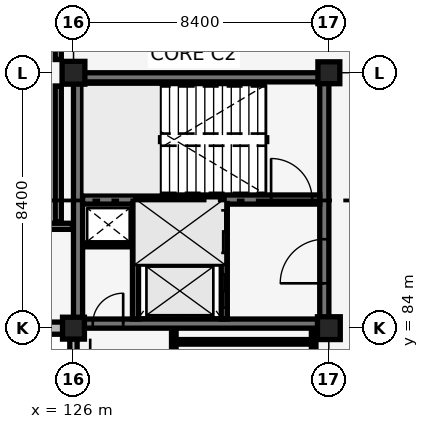
"""IFC4 building model, lengths in metres.
Left out: names, types, materials, properties, quantities, classifications, styles, units other than length and angle.
Written with IfcOpenShell. Run it as: python <this file> out.ifc"""

import sys

from ifc_helpers import new_model, si_unit, direction, frame, frame_2d, origin, origin_2d, place, context, subcontext, project, spatial, rectangle, extrude, element, fill, save


model = new_model("IFC4")
c1 = context("Model", 3, precision=1e-05, world=origin(), true_north=direction((0.0, 1.0)))
c2 = subcontext(c1, "Body", "Model", "MODEL_VIEW")
j1 = project(units=[si_unit("LENGTHUNIT", "METRE"), si_unit("PLANEANGLEUNIT", "RADIAN")], contexts=[c1])
p1 = place(None, origin())
s1 = spatial("IfcSite", under=j1, at=p1, CompositionType="ELEMENT")
p2 = place(p1, origin())
s2 = spatial("IfcBuilding", under=s1, at=p2, CompositionType="ELEMENT")
p3 = place(p2, frame((0.0, 0.0, 5.44)))
s3 = spatial("IfcBuildingStorey", under=s2, at=p3, CompositionType="ELEMENT", Elevation=5.44)
p4 = place(p3, frame((126.15, 84.15, 0.0), z_axis=(0.0, 0.0, 1.0), x_axis=(1.0, 0.0, 0.0)))
e1 = element("IfcWall", 1, at=p4, inside=s3, PredefinedType="SHEAR", context=c2, shape_type="SweptSolid", body=[
    extrude(rectangle(XDim=8.1, YDim=0.3, at=frame_2d((4.05, 0.0))), origin(), (0.0, 0.0, 1.0), 4.12),
])
p5 = place(p4, frame((0.485, 0.0, 0.0)))
e2 = element("IfcOpeningElement", 2, at=p5, cuts=e1, PredefinedType="OPENING", context=c2, shape_type="SweptSolid", body=[
    extrude(rectangle(XDim=1.0, YDim=2.15, at=frame_2d((0.5, 1.075))), frame((0.0, 0.16, 0.0), z_axis=(0.0, -1.0, 0.0), x_axis=(1.0, 0.0, 0.0)), (0.0, 0.0, 1.0), 0.32),
])
for number, where, z_axis, x_axis in (
    (3, (126.15, 92.25, 0.0), (0.0, 0.0, 1.0), (1.0, 0.0, 0.0)),
    (4, (126.15, 84.15, 0.0), (0.0, 0.0, 1.0), (0.0, 1.0, 0.0)),
):
    element("IfcWall", number, at=place(p3, frame(where, z_axis=z_axis, x_axis=x_axis)), inside=s3, PredefinedType="SHEAR", context=c2, shape_type="SweptSolid", body=[
        extrude(rectangle(XDim=8.1, YDim=0.3, at=frame_2d((4.05, 0.0))), origin(), (0.0, 0.0, 1.0), 4.12),
    ])
p6 = place(p3, frame((134.25, 84.15, 0.0), z_axis=(0.0, 0.0, 1.0), x_axis=(0.0, 1.0, 0.0)))
e5 = element("IfcWall", 5, at=p6, inside=s3, PredefinedType="SHEAR", context=c2, shape_type="SweptSolid", body=[
    extrude(rectangle(XDim=8.1, YDim=0.3, at=frame_2d((4.05, 0.0))), origin(), (0.0, 0.0, 1.0), 4.12),
])
p7 = place(p6, frame((1.325, 0.0, 0.0)))
e6 = element("IfcOpeningElement", 6, at=p7, cuts=e5, PredefinedType="OPENING", context=c2, shape_type="SweptSolid", body=[
    extrude(rectangle(XDim=1.45, YDim=2.15, at=frame_2d((0.725, 1.075))), frame((0.0, 0.16, 0.0), z_axis=(0.0, -1.0, 0.0), x_axis=(1.0, 0.0, 0.0)), (0.0, 0.0, 1.0), 0.32),
])
p8 = place(p3, frame((126.3, 88.23, 0.0), z_axis=(0.0, 0.0, 1.0), x_axis=(1.0, 0.0, 0.0)))
e7 = element("IfcWall", 7, at=p8, inside=s3, PredefinedType="SHEAR", context=c2, shape_type="SweptSolid", body=[
    extrude(rectangle(XDim=7.8, YDim=0.3, at=frame_2d((3.9, 0.0))), origin(), (0.0, 0.0, 1.0), 4.12),
])
p9 = place(p8, frame((6.2, 0.0, 0.0)))
e8 = element("IfcOpeningElement", 8, at=p9, cuts=e7, PredefinedType="OPENING", context=c2, shape_type="SweptSolid", body=[
    extrude(rectangle(XDim=1.35, YDim=2.15, at=frame_2d((0.675, 1.075))), frame((0.0, 0.16, 0.0), z_axis=(0.0, -1.0, 0.0), x_axis=(1.0, 0.0, 0.0)), (0.0, 0.0, 1.0), 0.32),
])
p10 = place(p3, frame((126.0, 84.0, 0.0), z_axis=(0.0, 0.0, 1.0), x_axis=(1.0, 0.0, 0.0)))
e9 = element("IfcColumn", 9, at=p10, inside=s3, PredefinedType="COLUMN", context=c2, shape_type="SweptSolid", body=[
    extrude(rectangle(XDim=0.72, YDim=0.72, at=origin_2d()), origin(), (0.0, 0.0, 1.0), 4.12),
])
for number, where, z_axis, x_axis in (
    (10, (126.0, 92.4, 0.0), (0.0, 0.0, 1.0), (1.0, 0.0, 0.0)),
    (11, (134.4, 84.0, 0.0), (0.0, 0.0, 1.0), (1.0, 0.0, 0.0)),
):
    element("IfcColumn", number, at=place(p3, frame(where, z_axis=z_axis, x_axis=x_axis)), inside=s3, PredefinedType="COLUMN", context=c2, shape_type="SweptSolid", body=[
        extrude(rectangle(XDim=0.75, YDim=0.75, at=origin_2d()), origin(), (0.0, 0.0, 1.0), 4.12),
    ])
p11 = place(p3, frame((134.4, 92.4, 0.0), z_axis=(0.0, 0.0, 1.0), x_axis=(1.0, 0.0, 0.0)))
e12 = element("IfcColumn", 12, at=p11, inside=s3, PredefinedType="COLUMN", context=c2, shape_type="SweptSolid", body=[
    extrude(rectangle(XDim=0.72, YDim=0.72, at=origin_2d()), origin(), (0.0, 0.0, 1.0), 4.12),
])
p12 = place(p3, frame((117.91, 84.0, 0.0), z_axis=(0.0, 0.0, 1.0), x_axis=(1.0, 0.0, 0.0)))
e13 = element("IfcWall", 13, at=p12, inside=s3, PredefinedType="SOLIDWALL", context=c2, shape_type="SweptSolid", body=[
    extrude(rectangle(XDim=7.745, YDim=0.4, at=frame_2d((3.873, 0.0))), origin(), (0.0, 0.0, 1.0), 3.38),
])
p13 = place(p12, frame((1.096, 0.0, 0.7)))
e14 = element("IfcOpeningElement", 14, at=p13, cuts=e13, PredefinedType="OPENING", context=c2, shape_type="SweptSolid", body=[
    extrude(rectangle(XDim=0.75, YDim=2.1, at=frame_2d((0.375, 1.05))), frame((0.0, 0.21, 0.0), z_axis=(0.0, -1.0, 0.0), x_axis=(1.0, 0.0, 0.0)), (0.0, 0.0, 1.0), 0.42),
])
p14 = place(p12, frame((2.646, 0.0, 0.7)))
e15 = element("IfcOpeningElement", 15, at=p14, cuts=e13, PredefinedType="OPENING", context=c2, shape_type="SweptSolid", body=[
    extrude(rectangle(XDim=0.75, YDim=2.1, at=frame_2d((0.375, 1.05))), frame((0.0, 0.21, 0.0), z_axis=(0.0, -1.0, 0.0), x_axis=(1.0, 0.0, 0.0)), (0.0, 0.0, 1.0), 0.42),
])
p15 = place(p12, frame((4.349, 0.0, 0.7)))
e16 = element("IfcOpeningElement", 16, at=p15, cuts=e13, PredefinedType="OPENING", context=c2, shape_type="SweptSolid", body=[
    extrude(rectangle(XDim=0.75, YDim=2.1, at=frame_2d((0.375, 1.05))), frame((0.0, 0.21, 0.0), z_axis=(0.0, -1.0, 0.0), x_axis=(1.0, 0.0, 0.0)), (0.0, 0.0, 1.0), 0.42),
])
p16 = place(p3, frame((126.0, 75.96, 0.0), z_axis=(0.0, 0.0, 1.0), x_axis=(0.0, 1.0, 0.0)))
e17 = element("IfcWall", 17, at=p16, inside=s3, PredefinedType="SOLIDWALL", context=c2, shape_type="SweptSolid", body=[
    extrude(rectangle(XDim=7.695, YDim=0.24, at=frame_2d((3.848, 0.0))), origin(), (0.0, 0.0, 1.0), 3.37),
])
p17 = place(p16, frame((0.79, 0.0, 0.35)))
e18 = element("IfcOpeningElement", 18, at=p17, cuts=e17, PredefinedType="OPENING", context=c2, shape_type="SweptSolid", body=[
    extrude(rectangle(XDim=0.44, YDim=1.25, at=frame_2d((0.22, 0.625))), frame((0.0, 0.13, 0.0), z_axis=(0.0, -1.0, 0.0), x_axis=(1.0, 0.0, 0.0)), (0.0, 0.0, 1.0), 0.26),
])
p18 = place(p16, frame((2.208, 0.0, 0.35)))
e19 = element("IfcOpeningElement", 19, at=p18, cuts=e17, PredefinedType="OPENING", context=c2, shape_type="SweptSolid", body=[
    extrude(rectangle(XDim=0.44, YDim=1.25, at=frame_2d((0.22, 0.625))), frame((0.0, 0.13, 0.0), z_axis=(0.0, -1.0, 0.0), x_axis=(1.0, 0.0, 0.0)), (0.0, 0.0, 1.0), 0.26),
])
p19 = place(p16, frame((3.627, 0.0, 0.35)))
e20 = element("IfcOpeningElement", 20, at=p19, cuts=e17, PredefinedType="OPENING", context=c2, shape_type="SweptSolid", body=[
    extrude(rectangle(XDim=0.44, YDim=1.25, at=frame_2d((0.22, 0.625))), frame((0.0, 0.13, 0.0), z_axis=(0.0, -1.0, 0.0), x_axis=(1.0, 0.0, 0.0)), (0.0, 0.0, 1.0), 0.26),
])
p20 = place(p16, frame((5.046, 0.0, 0.35)))
e21 = element("IfcOpeningElement", 21, at=p20, cuts=e17, PredefinedType="OPENING", context=c2, shape_type="SweptSolid", body=[
    extrude(rectangle(XDim=0.44, YDim=1.25, at=frame_2d((0.22, 0.625))), frame((0.0, 0.13, 0.0), z_axis=(0.0, -1.0, 0.0), x_axis=(1.0, 0.0, 0.0)), (0.0, 0.0, 1.0), 0.26),
])
p21 = place(p16, frame((6.466, 0.0, 0.35)))
e22 = element("IfcOpeningElement", 22, at=p21, cuts=e17, PredefinedType="OPENING", context=c2, shape_type="SweptSolid", body=[
    extrude(rectangle(XDim=0.44, YDim=1.25, at=frame_2d((0.22, 0.625))), frame((0.0, 0.13, 0.0), z_axis=(0.0, -1.0, 0.0), x_axis=(1.0, 0.0, 0.0)), (0.0, 0.0, 1.0), 0.26),
])
p22 = place(p16, frame((0.79, 0.0, 1.8)))
e23 = element("IfcOpeningElement", 23, at=p22, cuts=e17, PredefinedType="OPENING", context=c2, shape_type="SweptSolid", body=[
    extrude(rectangle(XDim=0.44, YDim=1.25, at=frame_2d((0.22, 0.625))), frame((0.0, 0.13, 0.0), z_axis=(0.0, -1.0, 0.0), x_axis=(1.0, 0.0, 0.0)), (0.0, 0.0, 1.0), 0.26),
])
p23 = place(p16, frame((2.208, 0.0, 1.8)))
e24 = element("IfcOpeningElement", 24, at=p23, cuts=e17, PredefinedType="OPENING", context=c2, shape_type="SweptSolid", body=[
    extrude(rectangle(XDim=0.44, YDim=1.25, at=frame_2d((0.22, 0.625))), frame((0.0, 0.13, 0.0), z_axis=(0.0, -1.0, 0.0), x_axis=(1.0, 0.0, 0.0)), (0.0, 0.0, 1.0), 0.26),
])
p24 = place(p16, frame((3.627, 0.0, 1.8)))
e25 = element("IfcOpeningElement", 25, at=p24, cuts=e17, PredefinedType="OPENING", context=c2, shape_type="SweptSolid", body=[
    extrude(rectangle(XDim=0.44, YDim=1.25, at=frame_2d((0.22, 0.625))), frame((0.0, 0.13, 0.0), z_axis=(0.0, -1.0, 0.0), x_axis=(1.0, 0.0, 0.0)), (0.0, 0.0, 1.0), 0.26),
])
p25 = place(p16, frame((5.046, 0.0, 1.8)))
e26 = element("IfcOpeningElement", 26, at=p25, cuts=e17, PredefinedType="OPENING", context=c2, shape_type="SweptSolid", body=[
    extrude(rectangle(XDim=0.44, YDim=1.25, at=frame_2d((0.22, 0.625))), frame((0.0, 0.13, 0.0), z_axis=(0.0, -1.0, 0.0), x_axis=(1.0, 0.0, 0.0)), (0.0, 0.0, 1.0), 0.26),
])
p26 = place(p16, frame((6.466, 0.0, 1.8)))
e27 = element("IfcOpeningElement", 27, at=p26, cuts=e17, PredefinedType="OPENING", context=c2, shape_type="SweptSolid", body=[
    extrude(rectangle(XDim=0.44, YDim=1.25, at=frame_2d((0.22, 0.625))), frame((0.0, 0.13, 0.0), z_axis=(0.0, -1.0, 0.0), x_axis=(1.0, 0.0, 0.0)), (0.0, 0.0, 1.0), 0.26),
])
p27 = place(p3, frame((130.96, 84.3, 0.0), z_axis=(0.0, 0.0, 1.0), x_axis=(0.0, 1.0, 0.0)))
e28 = element("IfcWall", 28, at=p27, inside=s3, PredefinedType="SHEAR", context=c2, shape_type="SweptSolid", body=[
    extrude(rectangle(XDim=3.8, YDim=0.2, at=frame_2d((1.9, 0.0))), origin(), (0.0, 0.0, 1.0), 3.34),
])
p28 = place(p27, frame((0.375, 0.0, 0.0)))
e29 = element("IfcOpeningElement", 29, at=p28, cuts=e28, PredefinedType="OPENING", context=c2, shape_type="SweptSolid", body=[
    extrude(rectangle(XDim=1.1, YDim=2.15, at=frame_2d((0.55, 1.075))), frame((0.0, 0.11, 0.0), z_axis=(0.0, -1.0, 0.0), x_axis=(1.0, 0.0, 0.0)), (0.0, 0.0, 1.0), 0.22),
])
p29 = place(p27, frame((2.175, 0.0, 0.0)))
e30 = element("IfcOpeningElement", 30, at=p29, cuts=e28, PredefinedType="OPENING", context=c2, shape_type="SweptSolid", body=[
    extrude(rectangle(XDim=1.4, YDim=2.2, at=frame_2d((0.7, 1.1))), frame((0.0, 0.11, 0.0), z_axis=(0.0, -1.0, 0.0), x_axis=(1.0, 0.0, 0.0)), (0.0, 0.0, 1.0), 0.22),
])
p30 = place(p3, frame((128.04, 84.3, 0.0), z_axis=(0.0, 0.0, 1.0), x_axis=(0.0, 1.0, 0.0)))
e31 = element("IfcWall", 31, at=p30, inside=s3, PredefinedType="SHEAR", context=c2, shape_type="SweptSolid", body=[
    extrude(rectangle(XDim=3.8, YDim=0.2, at=frame_2d((1.9, 0.0))), origin(), (0.0, 0.0, 1.0), 3.34),
])
p31 = place(p3, frame((128.15, 86.2, 0.0), z_axis=(0.0, 0.0, 1.0), x_axis=(1.0, 0.0, 0.0)))
e32 = element("IfcWall", 32, at=p31, inside=s3, PredefinedType="SHEAR", context=c2, shape_type="SweptSolid", body=[
    extrude(rectangle(XDim=2.7, YDim=0.18, at=frame_2d((1.35, 0.0))), origin(), (0.0, 0.0, 1.0), 4.12),
])
p32 = place(p3, frame((126.32, 86.74, 0.0), z_axis=(0.0, 0.0, 1.0), x_axis=(1.0, 0.0, 0.0)))
e33 = element("IfcWall", 33, at=p32, inside=s3, PredefinedType="PARTITIONING", context=c2, shape_type="SweptSolid", body=[
    extrude(rectangle(XDim=1.62, YDim=0.13, at=frame_2d((0.81, 0.0))), origin(), (0.0, 0.0, 1.0), 4.12),
])
p33 = place(p3, frame((129.45, 83.55, 0.0), z_axis=(0.0, 0.0, 1.0), x_axis=(1.0, 0.0, 0.0)))
e34 = element("IfcWall", 34, at=p33, inside=s3, PredefinedType="PARTITIONING", context=c2, shape_type="SweptSolid", body=[
    extrude(rectangle(XDim=4.3, YDim=0.15, at=frame_2d((2.15, 0.0))), origin(), (0.0, 0.0, 1.0), 4.12),
])
for number, where, z_axis, x_axis in (
    (35, (129.3, 36.7, 0.0), (0.0, 0.0, 1.0), (0.0, 1.0, 0.0)),
    (36, (133.9, 36.7, 0.0), (0.0, 0.0, 1.0), (0.0, 1.0, 0.0)),
):
    element("IfcWall", number, at=place(p3, frame(where, z_axis=z_axis, x_axis=x_axis)), inside=s3, PredefinedType="PARTITIONING", context=c2, shape_type="SweptSolid", body=[
        extrude(rectangle(XDim=47.27, YDim=0.15, at=frame_2d((23.635, 0.0))), origin(), (0.0, 0.0, 1.0), 3.34),
    ])
p34 = place(p3, frame((109.23, 87.35, 0.0), z_axis=(0.0, 0.0, 1.0), x_axis=(1.0, 0.0, 0.0)))
e37 = element("IfcWall", 37, at=p34, inside=s3, PredefinedType="PARTITIONING", context=c2, shape_type="SweptSolid", body=[
    extrude(rectangle(XDim=16.74, YDim=0.2, at=frame_2d((8.37, 0.0))), origin(), (0.0, 0.0, 1.0), 3.47),
])
p35 = place(p34, frame((7.62, 0.0, 0.0)))
e38 = element("IfcOpeningElement", 38, at=p35, cuts=e37, PredefinedType="OPENING", context=c2, shape_type="SweptSolid", body=[
    extrude(rectangle(XDim=1.5, YDim=2.2, at=frame_2d((0.75, 1.1))), frame((0.0, 0.11, 0.0), z_axis=(0.0, -1.0, 0.0), x_axis=(1.0, 0.0, 0.0)), (0.0, 0.0, 1.0), 0.22),
])
p36 = place(p3, frame((125.5, 87.5, 0.0), z_axis=(0.0, 0.0, 1.0), x_axis=(0.0, 1.0, 0.0)))
e39 = element("IfcWall", 39, at=p36, inside=s3, PredefinedType="PARTITIONING", context=c2, shape_type="SweptSolid", body=[
    extrude(rectangle(XDim=4.465, YDim=0.2, at=frame_2d((2.232, 0.0))), origin(), (0.0, 0.0, 1.0), 3.6),
])
p37 = place(p3, frame((125.5, 92.835, 0.0), z_axis=(0.0, 0.0, 1.0), x_axis=(0.0, 1.0, 0.0)))
e40 = element("IfcWall", 40, at=p37, inside=s3, PredefinedType="PARTITIONING", context=c2, shape_type="SweptSolid", body=[
    extrude(rectangle(XDim=7.545, YDim=0.2, at=frame_2d((3.772, 0.0))), origin(), (0.0, 0.0, 1.0), 3.62),
])
p38 = place(p9, origin())
e41 = element("IfcDoor", 41, at=p38, inside=s3, OperationType="SINGLE_SWING_LEFT", PredefinedType="DOOR", context=c2, shape_type="SweptSolid", body=[
    extrude(rectangle(XDim=1.35, YDim=2.15, at=frame_2d((0.675, 1.075))), frame((0.0, 0.025, 0.0), z_axis=(0.0, -1.0, 0.0), x_axis=(1.0, 0.0, 0.0)), (0.0, 0.0, 1.0), 0.05),
])
fill(e8, e41)
p39 = place(p28, origin())
e42 = element("IfcDoor", 42, at=p39, inside=s3, OperationType="SLIDING_TO_LEFT", PredefinedType="DOOR", context=c2, shape_type="SweptSolid", body=[
    extrude(rectangle(XDim=1.1, YDim=2.15, at=frame_2d((0.55, 1.075))), frame((0.0, 0.025, 0.0), z_axis=(0.0, -1.0, 0.0), x_axis=(1.0, 0.0, 0.0)), (0.0, 0.0, 1.0), 0.05),
])
fill(e29, e42)
p40 = place(p29, origin())
e43 = element("IfcDoor", 43, at=p40, inside=s3, OperationType="SLIDING_TO_LEFT", PredefinedType="DOOR", context=c2, shape_type="SweptSolid", body=[
    extrude(rectangle(XDim=1.4, YDim=2.2, at=frame_2d((0.7, 1.1))), frame((0.0, 0.025, 0.0), z_axis=(0.0, -1.0, 0.0), x_axis=(1.0, 0.0, 0.0)), (0.0, 0.0, 1.0), 0.05),
])
fill(e30, e43)
p41 = place(p7, origin())
e44 = element("IfcDoor", 44, at=p41, inside=s3, OperationType="DOUBLE_DOOR_SINGLE_SWING", PredefinedType="DOOR", context=c2, shape_type="SweptSolid", body=[
    extrude(rectangle(XDim=1.45, YDim=2.15, at=frame_2d((0.725, 1.075))), frame((0.0, 0.025, 0.0), z_axis=(0.0, -1.0, 0.0), x_axis=(1.0, 0.0, 0.0)), (0.0, 0.0, 1.0), 0.05),
])
fill(e6, e44)
p42 = place(p5, origin())
e45 = element("IfcDoor", 45, at=p42, inside=s3, OperationType="SINGLE_SWING_RIGHT", PredefinedType="DOOR", context=c2, shape_type="SweptSolid", body=[
    extrude(rectangle(XDim=1.0, YDim=2.15, at=frame_2d((0.5, 1.075))), frame((0.0, 0.025, 0.0), z_axis=(0.0, -1.0, 0.0), x_axis=(1.0, 0.0, 0.0)), (0.0, 0.0, 1.0), 0.05),
])
fill(e2, e45)
save(model, sys.argv[1])
